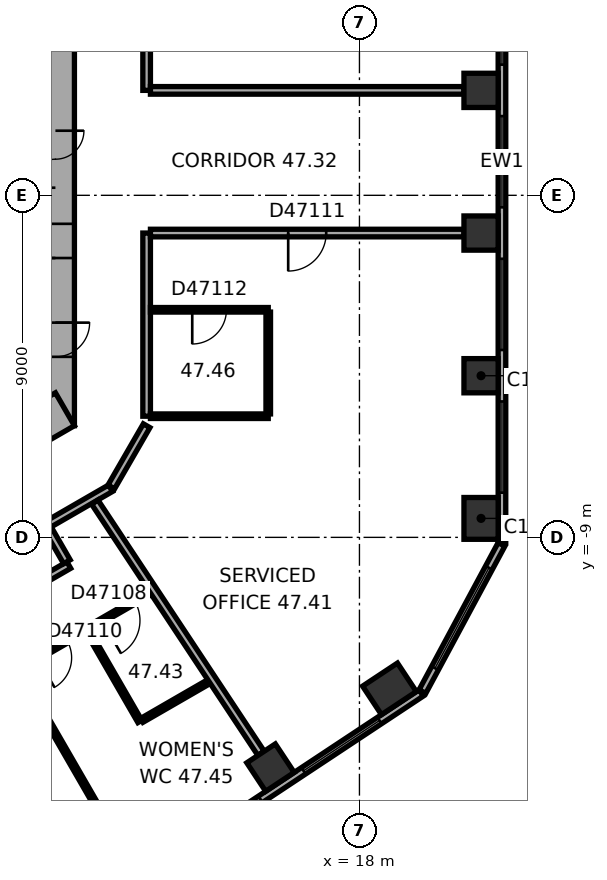
"""IFC4 building model, lengths in metres.
Left out: names, types, materials, properties, quantities, classifications, styles, units other than length and angle.
Written with IfcOpenShell. Run it as: python <this file> out.ifc"""

import sys

from ifc_helpers import new_model, si_unit, direction, frame, frame_2d, origin, origin_2d, place, context, subcontext, project, spatial, rectangle, extrude, element, fill, save


model = new_model("IFC4")
c1 = context("Model", 3, precision=1e-05, world=origin(), true_north=direction((0.0, 1.0)))
c2 = subcontext(c1, "Body", "Model", "MODEL_VIEW")
j1 = project(units=[si_unit("LENGTHUNIT", "METRE"), si_unit("PLANEANGLEUNIT", "RADIAN")], contexts=[c1])
p1 = place(None, origin())
s1 = spatial("IfcSite", under=j1, at=p1, CompositionType="ELEMENT")
p2 = place(p1, origin())
s2 = spatial("IfcBuilding", under=s1, at=p2, CompositionType="ELEMENT")
p3 = place(p2, frame((0.0, 0.0, 191.0)))
s3 = spatial("IfcBuildingStorey", under=s2, at=p3, CompositionType="ELEMENT", Elevation=191.0)
p4 = place(p3, frame((21.2, -8.501, 0.0), z_axis=(0.0, 0.0, 1.0), x_axis=(0.0, 1.0, 0.0)))
e1 = element("IfcColumn", 1, at=p4, inside=s3, PredefinedType="COLUMN", context=c2, shape_type="SweptSolid", body=[
    extrude(rectangle(XDim=1.1, YDim=0.9, at=origin_2d()), origin(), (0.0, 0.0, 1.0), 3.7),
])
for number, where, z_axis, x_axis in (
    (2, (21.2, -4.747, 0.0), (0.0, 0.0, 1.0), (0.0, 1.0, 0.0)),
    (3, (21.2, -0.993, 0.0), (0.0, 0.0, 1.0), (0.0, 1.0, 0.0)),
    (4, (21.2, 2.761, 0.0), (0.0, 0.0, 1.0), (0.0, 1.0, 0.0)),
    (5, (15.659, -15.058, 0.0), (0.0, 0.0, 1.0), (0.834, 0.552, 0.0)),
):
    element("IfcColumn", number, at=place(p3, frame(where, z_axis=z_axis, x_axis=x_axis)), inside=s3, PredefinedType="COLUMN", context=c2, shape_type="SweptSolid", body=[
        extrude(rectangle(XDim=0.9, YDim=0.9, at=origin_2d()), origin(), (0.0, 0.0, 1.0), 3.7),
    ])
p5 = place(p3, frame((18.79, -12.986, 0.0), z_axis=(0.0, 0.0, 1.0), x_axis=(0.833885822067, 0.551936985312, 0.0)))
e6 = element("IfcColumn", 6, at=p5, inside=s3, PredefinedType="COLUMN", context=c2, shape_type="SweptSolid", body=[
    extrude(rectangle(XDim=1.1, YDim=0.9, at=origin_2d()), origin(), (0.0, 0.0, 1.0), 3.7),
])
p6 = place(p3, frame((10.0, -6.062, 0.0), z_axis=(0.0, 0.0, 1.0), x_axis=(0.0, 1.0, 0.0)))
e7 = element("IfcWall", 7, at=p6, inside=s3, PredefinedType="SHEAR", context=c2, shape_type="SweptSolid", body=[
    extrude(rectangle(XDim=12.125, YDim=1.0, at=frame_2d((6.062, 0.0))), origin(), (0.0, 0.0, 1.0), 3.7),
])
p7 = place(p6, frame((6.262, 0.0, 0.0)))
e8 = element("IfcOpeningElement", 8, at=p7, cuts=e7, PredefinedType="OPENING", context=c2, shape_type="SweptSolid", body=[
    extrude(rectangle(XDim=1.5, YDim=2.1, at=frame_2d((0.75, 1.05))), frame((0.0, 0.51, 0.0), z_axis=(0.0, -1.0, 0.0), x_axis=(1.0, 0.0, 0.0)), (0.0, 0.0, 1.0), 1.02),
])
p8 = place(p6, frame((1.812, 0.0, 0.0)))
e9 = element("IfcOpeningElement", 9, at=p8, cuts=e7, PredefinedType="OPENING", context=c2, shape_type="SweptSolid", body=[
    extrude(rectangle(XDim=0.9, YDim=2.1, at=frame_2d((0.45, 1.05))), frame((0.0, 0.51, 0.0), z_axis=(0.0, -1.0, 0.0), x_axis=(1.0, 0.0, 0.0)), (0.0, 0.0, 1.0), 1.02),
])
p9 = place(p6, frame((4.412, 0.0, 0.0)))
e10 = element("IfcOpeningElement", 10, at=p9, cuts=e7, PredefinedType="OPENING", context=c2, shape_type="SweptSolid", body=[
    extrude(rectangle(XDim=0.9, YDim=2.1, at=frame_2d((0.45, 1.05))), frame((0.0, 0.51, 0.0), z_axis=(0.0, -1.0, 0.0), x_axis=(1.0, 0.0, 0.0)), (0.0, 0.0, 1.0), 1.02),
])
p10 = place(p3, frame((-0.25, -11.691, 0.0), z_axis=(0.0, 0.0, 1.0), x_axis=(0.866022616891, 0.50000482701, 0.0)))
e11 = element("IfcWall", 11, at=p10, inside=s3, PredefinedType="SHEAR", context=c2, shape_type="SweptSolid", body=[
    extrude(rectangle(XDim=12.125, YDim=1.0, at=frame_2d((6.062, 0.0))), origin(), (0.0, 0.0, 1.0), 3.7),
])
p11 = place(p10, frame((2.612, 0.0, 0.0)))
e12 = element("IfcOpeningElement", 12, at=p11, cuts=e11, PredefinedType="OPENING", context=c2, shape_type="SweptSolid", body=[
    extrude(rectangle(XDim=1.1, YDim=2.1, at=frame_2d((0.55, 1.05))), frame((0.0, 0.51, 0.0), z_axis=(0.0, -1.0, 0.0), x_axis=(1.0, 0.0, 0.0)), (0.0, 0.0, 1.0), 1.02),
])
p12 = place(p10, frame((5.212, 0.0, 0.0)))
e13 = element("IfcOpeningElement", 13, at=p12, cuts=e11, PredefinedType="OPENING", context=c2, shape_type="SweptSolid", body=[
    extrude(rectangle(XDim=1.1, YDim=2.1, at=frame_2d((0.55, 1.05))), frame((0.0, 0.51, 0.0), z_axis=(0.0, -1.0, 0.0), x_axis=(1.0, 0.0, 0.0)), (0.0, 0.0, 1.0), 1.02),
])
p13 = place(p10, frame((7.812, 0.0, 0.0)))
e14 = element("IfcOpeningElement", 14, at=p13, cuts=e11, PredefinedType="OPENING", context=c2, shape_type="SweptSolid", body=[
    extrude(rectangle(XDim=1.1, YDim=2.1, at=frame_2d((0.55, 1.05))), frame((0.0, 0.51, 0.0), z_axis=(0.0, -1.0, 0.0), x_axis=(1.0, 0.0, 0.0)), (0.0, 0.0, 1.0), 1.02),
])
p14 = place(p3, frame((21.75, -9.138, 0.0), z_axis=(0.0, 0.0, 1.0), x_axis=(0.0, 1.0, 0.0)))
e15 = element("IfcWall", 15, at=p14, inside=s3, PredefinedType="STANDARD", context=c2, shape_type="SweptSolid", body=[
    extrude(rectangle(XDim=20.044, YDim=0.2, at=frame_2d((10.022, 0.0))), origin(), (0.0, 0.0, 1.0), 3.7),
])
p15 = place(p14, frame((1.314, 0.0, 0.9)))
e16 = element("IfcOpeningElement", 16, at=p15, cuts=e15, PredefinedType="OPENING", context=c2, shape_type="SweptSolid", body=[
    extrude(rectangle(XDim=2.4, YDim=2.0, at=frame_2d((1.2, 1.0))), frame((0.0, 0.11, 0.0), z_axis=(0.0, -1.0, 0.0), x_axis=(1.0, 0.0, 0.0)), (0.0, 0.0, 1.0), 0.22),
])
p16 = place(p14, frame((5.069, 0.0, 0.9)))
e17 = element("IfcOpeningElement", 17, at=p16, cuts=e15, PredefinedType="OPENING", context=c2, shape_type="SweptSolid", body=[
    extrude(rectangle(XDim=2.4, YDim=2.0, at=frame_2d((1.2, 1.0))), frame((0.0, 0.11, 0.0), z_axis=(0.0, -1.0, 0.0), x_axis=(1.0, 0.0, 0.0)), (0.0, 0.0, 1.0), 0.22),
])
p17 = place(p14, frame((8.823, 0.0, 0.9)))
e18 = element("IfcOpeningElement", 18, at=p17, cuts=e15, PredefinedType="OPENING", context=c2, shape_type="SweptSolid", body=[
    extrude(rectangle(XDim=2.4, YDim=2.0, at=frame_2d((1.2, 1.0))), frame((0.0, 0.11, 0.0), z_axis=(0.0, -1.0, 0.0), x_axis=(1.0, 0.0, 0.0)), (0.0, 0.0, 1.0), 0.22),
])
p18 = place(p14, frame((12.577, 0.0, 0.9)))
e19 = element("IfcOpeningElement", 19, at=p18, cuts=e15, PredefinedType="OPENING", context=c2, shape_type="SweptSolid", body=[
    extrude(rectangle(XDim=2.4, YDim=2.0, at=frame_2d((1.2, 1.0))), frame((0.0, 0.11, 0.0), z_axis=(0.0, -1.0, 0.0), x_axis=(1.0, 0.0, 0.0)), (0.0, 0.0, 1.0), 0.22),
])
p19 = place(p14, frame((16.331, 0.0, 0.9)))
e20 = element("IfcOpeningElement", 20, at=p19, cuts=e15, PredefinedType="OPENING", context=c2, shape_type="SweptSolid", body=[
    extrude(rectangle(XDim=2.4, YDim=2.0, at=frame_2d((1.2, 1.0))), frame((0.0, 0.11, 0.0), z_axis=(0.0, -1.0, 0.0), x_axis=(1.0, 0.0, 0.0)), (0.0, 0.0, 1.0), 0.22),
])
p20 = place(p3, frame((2.911, -24.156, 0.0), z_axis=(0.0, 0.0, 1.0), x_axis=(0.833882163564, 0.551942512668, 0.0)))
e21 = element("IfcWall", 21, at=p20, inside=s3, PredefinedType="STANDARD", context=c2, shape_type="SweptSolid", body=[
    extrude(rectangle(XDim=20.044, YDim=0.2, at=frame_2d((10.022, 0.0))), origin(), (0.0, 0.0, 1.0), 3.7),
])
p21 = place(p20, frame((1.313, 0.0, 0.9)))
e22 = element("IfcOpeningElement", 22, at=p21, cuts=e21, PredefinedType="OPENING", context=c2, shape_type="SweptSolid", body=[
    extrude(rectangle(XDim=2.4, YDim=2.0, at=frame_2d((1.2, 1.0))), frame((0.0, 0.11, 0.0), z_axis=(0.0, -1.0, 0.0), x_axis=(1.0, 0.0, 0.0)), (0.0, 0.0, 1.0), 0.22),
])
p22 = place(p20, frame((5.067, 0.0, 0.9)))
e23 = element("IfcOpeningElement", 23, at=p22, cuts=e21, PredefinedType="OPENING", context=c2, shape_type="SweptSolid", body=[
    extrude(rectangle(XDim=2.4, YDim=2.0, at=frame_2d((1.2, 1.0))), frame((0.0, 0.11, 0.0), z_axis=(0.0, -1.0, 0.0), x_axis=(1.0, 0.0, 0.0)), (0.0, 0.0, 1.0), 0.22),
])
p23 = place(p20, frame((8.821, 0.0, 0.9)))
e24 = element("IfcOpeningElement", 24, at=p23, cuts=e21, PredefinedType="OPENING", context=c2, shape_type="SweptSolid", body=[
    extrude(rectangle(XDim=2.4, YDim=2.0, at=frame_2d((1.2, 1.0))), frame((0.0, 0.11, 0.0), z_axis=(0.0, -1.0, 0.0), x_axis=(1.0, 0.0, 0.0)), (0.0, 0.0, 1.0), 0.22),
])
p24 = place(p20, frame((12.575, 0.0, 0.9)))
e25 = element("IfcOpeningElement", 25, at=p24, cuts=e21, PredefinedType="OPENING", context=c2, shape_type="SweptSolid", body=[
    extrude(rectangle(XDim=2.4, YDim=2.0, at=frame_2d((1.2, 1.0))), frame((0.0, 0.11, 0.0), z_axis=(0.0, -1.0, 0.0), x_axis=(1.0, 0.0, 0.0)), (0.0, 0.0, 1.0), 0.22),
])
p25 = place(p20, frame((16.329, 0.0, 0.9)))
e26 = element("IfcOpeningElement", 26, at=p25, cuts=e21, PredefinedType="OPENING", context=c2, shape_type="SweptSolid", body=[
    extrude(rectangle(XDim=2.4, YDim=2.0, at=frame_2d((1.2, 1.0))), frame((0.0, 0.11, 0.0), z_axis=(0.0, -1.0, 0.0), x_axis=(1.0, 0.0, 0.0)), (0.0, 0.0, 1.0), 0.22),
])
p26 = place(p3, frame((19.658, -13.057, 0.0), z_axis=(0.0, 0.0, 1.0), x_axis=(0.473307879841, 0.880897071672, 0.0)))
e27 = element("IfcWall", 27, at=p26, inside=s3, PredefinedType="STANDARD", context=c2, shape_type="SweptSolid", body=[
    extrude(rectangle(XDim=4.395, YDim=0.2, at=frame_2d((2.197, 0.0))), origin(), (0.0, 0.0, 1.0), 3.7),
])
p27 = place(p26, frame((0.698, 0.0, 0.9)))
e28 = element("IfcOpeningElement", 28, at=p27, cuts=e27, PredefinedType="OPENING", context=c2, shape_type="SweptSolid", body=[
    extrude(rectangle(XDim=3.0, YDim=2.0, at=frame_2d((1.5, 1.0))), frame((0.0, 0.11, 0.0), z_axis=(0.0, -1.0, 0.0), x_axis=(1.0, 0.0, 0.0)), (0.0, 0.0, 1.0), 0.22),
])
p28 = place(p3, frame((2.816, -14.079, 0.0), z_axis=(0.0, 0.0, 1.0), x_axis=(0.866021128829, 0.500007404367, 0.0)))
e29 = element("IfcWall", 29, at=p28, inside=s3, PredefinedType="PARTITIONING", context=c2, shape_type="SweptSolid", body=[
    extrude(rectangle(XDim=8.702, YDim=0.2, at=frame_2d((4.351, 0.0))), origin(), (0.0, 0.0, 1.0), 3.42),
])
p29 = place(p28, frame((5.184, 0.0, 0.0)))
e30 = element("IfcOpeningElement", 30, at=p29, cuts=e29, PredefinedType="OPENING", context=c2, shape_type="SweptSolid", body=[
    extrude(rectangle(XDim=1.0, YDim=2.1, at=frame_2d((0.5, 1.05))), frame((0.0, 0.11, 0.0), z_axis=(0.0, -1.0, 0.0), x_axis=(1.0, 0.0, 0.0)), (0.0, 0.0, 1.0), 0.22),
])
p30 = place(p3, frame((6.152, -14.116, 0.0), z_axis=(0.0, 0.0, 1.0), x_axis=(0.866026788224, 0.499997602072, 0.0)))
e31 = element("IfcWall", 31, at=p30, inside=s3, PredefinedType="PARTITIONING", context=c2, shape_type="SweptSolid", body=[
    extrude(rectangle(XDim=7.322, YDim=0.12, at=frame_2d((3.661, 0.0))), origin(), (0.0, 0.0, 1.0), 3.42),
])
p31 = place(p30, frame((5.858, 0.0, 0.0)))
e32 = element("IfcOpeningElement", 32, at=p31, cuts=e31, PredefinedType="OPENING", context=c2, shape_type="SweptSolid", body=[
    extrude(rectangle(XDim=1.0, YDim=2.1, at=frame_2d((0.5, 1.05))), frame((0.0, 0.07, 0.0), z_axis=(0.0, -1.0, 0.0), x_axis=(1.0, 0.0, 0.0)), (0.0, 0.0, 1.0), 0.14),
])
p32 = place(p30, frame((1.2, 0.0, 0.0)))
e33 = element("IfcOpeningElement", 33, at=p32, cuts=e31, PredefinedType="OPENING", context=c2, shape_type="SweptSolid", body=[
    extrude(rectangle(XDim=0.9, YDim=2.1, at=frame_2d((0.45, 1.05))), frame((0.0, 0.07, 0.0), z_axis=(0.0, -1.0, 0.0), x_axis=(1.0, 0.0, 0.0)), (0.0, 0.0, 1.0), 0.14),
])
p33 = place(p30, frame((3.897, 0.0, 0.0)))
e34 = element("IfcOpeningElement", 34, at=p33, cuts=e31, PredefinedType="OPENING", context=c2, shape_type="SweptSolid", body=[
    extrude(rectangle(XDim=0.9, YDim=2.1, at=frame_2d((0.45, 1.05))), frame((0.0, 0.07, 0.0), z_axis=(0.0, -1.0, 0.0), x_axis=(1.0, 0.0, 0.0)), (0.0, 0.0, 1.0), 0.14),
])
p34 = place(p3, frame((9.752, -8.688, 0.0), z_axis=(0.0, 0.0, 1.0), x_axis=(0.865974105138, 0.500088841337, 0.0)))
e35 = element("IfcWall", 35, at=p34, inside=s3, PredefinedType="PARTITIONING", context=c2, shape_type="SweptSolid", body=[
    extrude(rectangle(XDim=1.961, YDim=0.2, at=frame_2d((0.98, 0.0))), origin(), (0.0, 0.0, 1.0), 3.42),
])
p35 = place(p3, frame((10.302, -9.642, 0.0), z_axis=(0.0, 0.0, 1.0), x_axis=(-0.500074377092, 0.865982457891, 0.0)))
e36 = element("IfcWall", 36, at=p35, inside=s3, PredefinedType="PARTITIONING", context=c2, shape_type="SweptSolid", body=[
    extrude(rectangle(XDim=1.001, YDim=0.2, at=frame_2d((0.5, 0.0))), origin(), (0.0, 0.0, 1.0), 3.42),
])
p36 = place(p3, frame((10.853, -11.472, 0.0), z_axis=(0.0, 0.0, 1.0), x_axis=(0.500048966069, -0.865997131366, 0.0)))
e37 = element("IfcWall", 37, at=p36, inside=s3, PredefinedType="PARTITIONING", context=c2, shape_type="SweptSolid", body=[
    extrude(rectangle(XDim=2.74, YDim=0.12, at=frame_2d((1.37, 0.0))), origin(), (0.0, 0.0, 1.0), 3.42),
])
p37 = place(p3, frame((11.47, -7.673, 0.0), z_axis=(0.0, 0.0, 1.0), x_axis=(0.499964847546, 0.866045698112, 0.0)))
e38 = element("IfcWall", 38, at=p37, inside=s3, PredefinedType="PARTITIONING", context=c2, shape_type="SweptSolid", body=[
    extrude(rectangle(XDim=1.86, YDim=0.2, at=frame_2d((0.93, 0.0))), origin(), (0.0, 0.0, 1.0), 3.42),
])
p38 = place(p3, frame((11.705, -17.136, 0.0), z_axis=(0.0, 0.0, 1.0), x_axis=(-0.499985382219, 0.8660338432, 0.0)))
e39 = element("IfcWall", 39, at=p38, inside=s3, PredefinedType="PARTITIONING", context=c2, shape_type="SweptSolid", body=[
    extrude(rectangle(XDim=5.332, YDim=0.12, at=frame_2d((2.666, 0.0))), origin(), (0.0, 0.0, 1.0), 3.42),
])
p39 = place(p3, frame((12.275, -13.814, 0.0), z_axis=(0.0, 0.0, 1.0), x_axis=(0.866010195725, 0.500026340207, 0.0)))
e40 = element("IfcWall", 40, at=p39, inside=s3, PredefinedType="PARTITIONING", context=c2, shape_type="SweptSolid", body=[
    extrude(rectangle(XDim=2.04, YDim=0.12, at=frame_2d((1.02, 0.0))), origin(), (0.0, 0.0, 1.0), 3.42),
])
p40 = place(p3, frame((12.4, -5.812, 0.0), z_axis=(0.0, 0.0, 1.0), x_axis=(0.0, 1.0, 0.0)))
e41 = element("IfcWall", 41, at=p40, inside=s3, PredefinedType="PARTITIONING", context=c2, shape_type="SweptSolid", body=[
    extrude(rectangle(XDim=4.819, YDim=0.2, at=frame_2d((2.41, 0.0))), origin(), (0.0, 0.0, 1.0), 3.42),
])
p41 = place(p3, frame((12.4, 2.761, 0.0), z_axis=(0.0, 0.0, 1.0), x_axis=(0.0, 1.0, 0.0)))
e42 = element("IfcWall", 42, at=p41, inside=s3, PredefinedType="PARTITIONING", context=c2, shape_type="SweptSolid", body=[
    extrude(rectangle(XDim=3.301, YDim=0.2, at=frame_2d((1.65, 0.0))), origin(), (0.0, 0.0, 1.0), 3.42),
])
p42 = place(p3, frame((12.5, -3.012, 0.0), z_axis=(0.0, 0.0, 1.0), x_axis=(1.0, 0.0, 0.0)))
e43 = element("IfcWall", 43, at=p42, inside=s3, PredefinedType="PARTITIONING", context=c2, shape_type="SweptSolid", body=[
    extrude(rectangle(XDim=3.1, YDim=0.12, at=frame_2d((1.55, 0.0))), origin(), (0.0, 0.0, 1.0), 3.42),
])
p43 = place(p42, frame((1.1, 0.0, 0.0)))
e44 = element("IfcOpeningElement", 44, at=p43, cuts=e43, PredefinedType="OPENING", context=c2, shape_type="SweptSolid", body=[
    extrude(rectangle(XDim=0.9, YDim=2.1, at=frame_2d((0.45, 1.05))), frame((0.0, 0.07, 0.0), z_axis=(0.0, -1.0, 0.0), x_axis=(1.0, 0.0, 0.0)), (0.0, 0.0, 1.0), 0.14),
])
p44 = place(p3, frame((12.5, -0.993, 0.0), z_axis=(0.0, 0.0, 1.0), x_axis=(1.0, 0.0, 0.0)))
e45 = element("IfcWall", 45, at=p44, inside=s3, PredefinedType="PARTITIONING", context=c2, shape_type="SweptSolid", body=[
    extrude(rectangle(XDim=8.25, YDim=0.2, at=frame_2d((4.125, 0.0))), origin(), (0.0, 0.0, 1.0), 2.87),
])
p45 = place(p44, frame((3.625, 0.0, 0.0)))
e46 = element("IfcOpeningElement", 46, at=p45, cuts=e45, PredefinedType="OPENING", context=c2, shape_type="SweptSolid", body=[
    extrude(rectangle(XDim=1.0, YDim=2.1, at=frame_2d((0.5, 1.05))), frame((0.0, 0.11, 0.0), z_axis=(0.0, -1.0, 0.0), x_axis=(1.0, 0.0, 0.0)), (0.0, 0.0, 1.0), 0.22),
])
p46 = place(p3, frame((15.411, -14.683, 0.0), z_axis=(0.0, 0.0, 1.0), x_axis=(-0.551932106251, 0.833889051427, 0.0)))
e47 = element("IfcWall", 47, at=p46, inside=s3, PredefinedType="PARTITIONING", context=c2, shape_type="SweptSolid", body=[
    extrude(rectangle(XDim=7.926, YDim=0.2, at=frame_2d((3.963, 0.0))), origin(), (0.0, 0.0, 1.0), 2.87),
])
p47 = place(p3, frame((15.6, -5.812, 0.0), z_axis=(0.0, 0.0, 1.0), x_axis=(-1.0, 0.0, 0.0)))
e48 = element("IfcWall", 48, at=p47, inside=s3, PredefinedType="PARTITIONING", context=c2, shape_type="SweptSolid", body=[
    extrude(rectangle(XDim=3.1, YDim=0.12, at=frame_2d((1.55, 0.0))), origin(), (0.0, 0.0, 1.0), 3.42),
])
p48 = place(p3, frame((15.6, -3.072, 0.0), z_axis=(0.0, 0.0, 1.0), x_axis=(0.0, -1.0, 0.0)))
e49 = element("IfcWall", 49, at=p48, inside=s3, PredefinedType="PARTITIONING", context=c2, shape_type="SweptSolid", body=[
    extrude(rectangle(XDim=2.68, YDim=0.12, at=frame_2d((1.34, 0.0))), origin(), (0.0, 0.0, 1.0), 3.42),
])
p49 = place(p3, frame((20.75, 2.761, 0.0), z_axis=(0.0, 0.0, 1.0), x_axis=(-1.0, 0.0, 0.0)))
e50 = element("IfcWall", 50, at=p49, inside=s3, PredefinedType="PARTITIONING", context=c2, shape_type="SweptSolid", body=[
    extrude(rectangle(XDim=8.25, YDim=0.2, at=frame_2d((4.125, 0.0))), origin(), (0.0, 0.0, 1.0), 3.42),
])
p50 = place(p15, origin())
e51 = element("IfcWindow", 51, at=p50, inside=s3, PartitioningType="SINGLE_PANEL", PredefinedType="WINDOW", context=c2, shape_type="SweptSolid", body=[
    extrude(rectangle(XDim=2.4, YDim=2.0, at=frame_2d((1.2, 1.0))), frame((0.0, 0.03, 0.0), z_axis=(0.0, -1.0, 0.0), x_axis=(1.0, 0.0, 0.0)), (0.0, 0.0, 1.0), 0.06),
])
fill(e16, e51)
p51 = place(p16, origin())
e52 = element("IfcWindow", 52, at=p51, inside=s3, PartitioningType="SINGLE_PANEL", PredefinedType="WINDOW", context=c2, shape_type="SweptSolid", body=[
    extrude(rectangle(XDim=2.4, YDim=2.0, at=frame_2d((1.2, 1.0))), frame((0.0, 0.03, 0.0), z_axis=(0.0, -1.0, 0.0), x_axis=(1.0, 0.0, 0.0)), (0.0, 0.0, 1.0), 0.06),
])
fill(e17, e52)
p52 = place(p17, origin())
e53 = element("IfcWindow", 53, at=p52, inside=s3, PartitioningType="SINGLE_PANEL", PredefinedType="WINDOW", context=c2, shape_type="SweptSolid", body=[
    extrude(rectangle(XDim=2.4, YDim=2.0, at=frame_2d((1.2, 1.0))), frame((0.0, 0.03, 0.0), z_axis=(0.0, -1.0, 0.0), x_axis=(1.0, 0.0, 0.0)), (0.0, 0.0, 1.0), 0.06),
])
fill(e18, e53)
p53 = place(p18, origin())
e54 = element("IfcWindow", 54, at=p53, inside=s3, PartitioningType="SINGLE_PANEL", PredefinedType="WINDOW", context=c2, shape_type="SweptSolid", body=[
    extrude(rectangle(XDim=2.4, YDim=2.0, at=frame_2d((1.2, 1.0))), frame((0.0, 0.03, 0.0), z_axis=(0.0, -1.0, 0.0), x_axis=(1.0, 0.0, 0.0)), (0.0, 0.0, 1.0), 0.06),
])
fill(e19, e54)
p54 = place(p24, origin())
e55 = element("IfcWindow", 55, at=p54, inside=s3, PartitioningType="SINGLE_PANEL", PredefinedType="WINDOW", context=c2, shape_type="SweptSolid", body=[
    extrude(rectangle(XDim=2.4, YDim=2.0, at=frame_2d((1.2, 1.0))), frame((0.0, 0.03, 0.0), z_axis=(0.0, -1.0, 0.0), x_axis=(1.0, 0.0, 0.0)), (0.0, 0.0, 1.0), 0.06),
])
fill(e25, e55)
p55 = place(p25, origin())
e56 = element("IfcWindow", 56, at=p55, inside=s3, PartitioningType="SINGLE_PANEL", PredefinedType="WINDOW", context=c2, shape_type="SweptSolid", body=[
    extrude(rectangle(XDim=2.4, YDim=2.0, at=frame_2d((1.2, 1.0))), frame((0.0, 0.03, 0.0), z_axis=(0.0, -1.0, 0.0), x_axis=(1.0, 0.0, 0.0)), (0.0, 0.0, 1.0), 0.06),
])
fill(e26, e56)
p56 = place(p27, origin())
e57 = element("IfcWindow", 57, at=p56, inside=s3, PartitioningType="SINGLE_PANEL", PredefinedType="WINDOW", context=c2, shape_type="SweptSolid", body=[
    extrude(rectangle(XDim=3.0, YDim=2.0, at=frame_2d((1.5, 1.0))), frame((0.0, 0.03, 0.0), z_axis=(0.0, -1.0, 0.0), x_axis=(1.0, 0.0, 0.0)), (0.0, 0.0, 1.0), 0.06),
])
fill(e28, e57)
p57 = place(p7, origin())
e58 = element("IfcDoor", 58, at=p57, inside=s3, OperationType="DOUBLE_DOOR_SINGLE_SWING", PredefinedType="DOOR", context=c2, shape_type="SweptSolid", body=[
    extrude(rectangle(XDim=1.5, YDim=2.1, at=frame_2d((0.75, 1.05))), frame((0.0, 0.025, 0.0), z_axis=(0.0, -1.0, 0.0), x_axis=(1.0, 0.0, 0.0)), (0.0, 0.0, 1.0), 0.05),
])
fill(e8, e58)
p58 = place(p8, origin())
e59 = element("IfcDoor", 59, at=p58, inside=s3, OperationType="SINGLE_SWING_LEFT", PredefinedType="DOOR", context=c2, shape_type="SweptSolid", body=[
    extrude(rectangle(XDim=0.9, YDim=2.1, at=frame_2d((0.45, 1.05))), frame((0.0, 0.025, 0.0), z_axis=(0.0, -1.0, 0.0), x_axis=(1.0, 0.0, 0.0)), (0.0, 0.0, 1.0), 0.05),
])
fill(e9, e59)
p59 = place(p9, origin())
e60 = element("IfcDoor", 60, at=p59, inside=s3, OperationType="SINGLE_SWING_LEFT", PredefinedType="DOOR", context=c2, shape_type="SweptSolid", body=[
    extrude(rectangle(XDim=0.9, YDim=2.1, at=frame_2d((0.45, 1.05))), frame((0.0, 0.025, 0.0), z_axis=(0.0, -1.0, 0.0), x_axis=(1.0, 0.0, 0.0)), (0.0, 0.0, 1.0), 0.05),
])
fill(e10, e60)
p60 = place(p31, origin())
e61 = element("IfcDoor", 61, at=p60, inside=s3, OperationType="SINGLE_SWING_LEFT", PredefinedType="DOOR", context=c2, shape_type="SweptSolid", body=[
    extrude(rectangle(XDim=1.0, YDim=2.1, at=frame_2d((0.5, 1.05))), frame((0.0, 0.025, 0.0), z_axis=(0.0, -1.0, 0.0), x_axis=(1.0, 0.0, 0.0)), (0.0, 0.0, 1.0), 0.05),
])
fill(e32, e61)
p61 = place(p33, origin())
e62 = element("IfcDoor", 62, at=p61, inside=s3, OperationType="SINGLE_SWING_LEFT", PredefinedType="DOOR", context=c2, shape_type="SweptSolid", body=[
    extrude(rectangle(XDim=0.9, YDim=2.1, at=frame_2d((0.45, 1.05))), frame((0.0, 0.025, 0.0), z_axis=(0.0, -1.0, 0.0), x_axis=(1.0, 0.0, 0.0)), (0.0, 0.0, 1.0), 0.05),
])
fill(e34, e62)
p62 = place(p45, origin())
e63 = element("IfcDoor", 63, at=p62, inside=s3, OperationType="SINGLE_SWING_LEFT", PredefinedType="DOOR", context=c2, shape_type="SweptSolid", body=[
    extrude(rectangle(XDim=1.0, YDim=2.1, at=frame_2d((0.5, 1.05))), frame((0.0, 0.025, 0.0), z_axis=(0.0, -1.0, 0.0), x_axis=(1.0, 0.0, 0.0)), (0.0, 0.0, 1.0), 0.05),
])
fill(e46, e63)
p63 = place(p43, origin())
e64 = element("IfcDoor", 64, at=p63, inside=s3, OperationType="SINGLE_SWING_LEFT", PredefinedType="DOOR", context=c2, shape_type="SweptSolid", body=[
    extrude(rectangle(XDim=0.9, YDim=2.1, at=frame_2d((0.45, 1.05))), frame((0.0, 0.025, 0.0), z_axis=(0.0, -1.0, 0.0), x_axis=(1.0, 0.0, 0.0)), (0.0, 0.0, 1.0), 0.05),
])
fill(e44, e64)
save(model, sys.argv[1])
